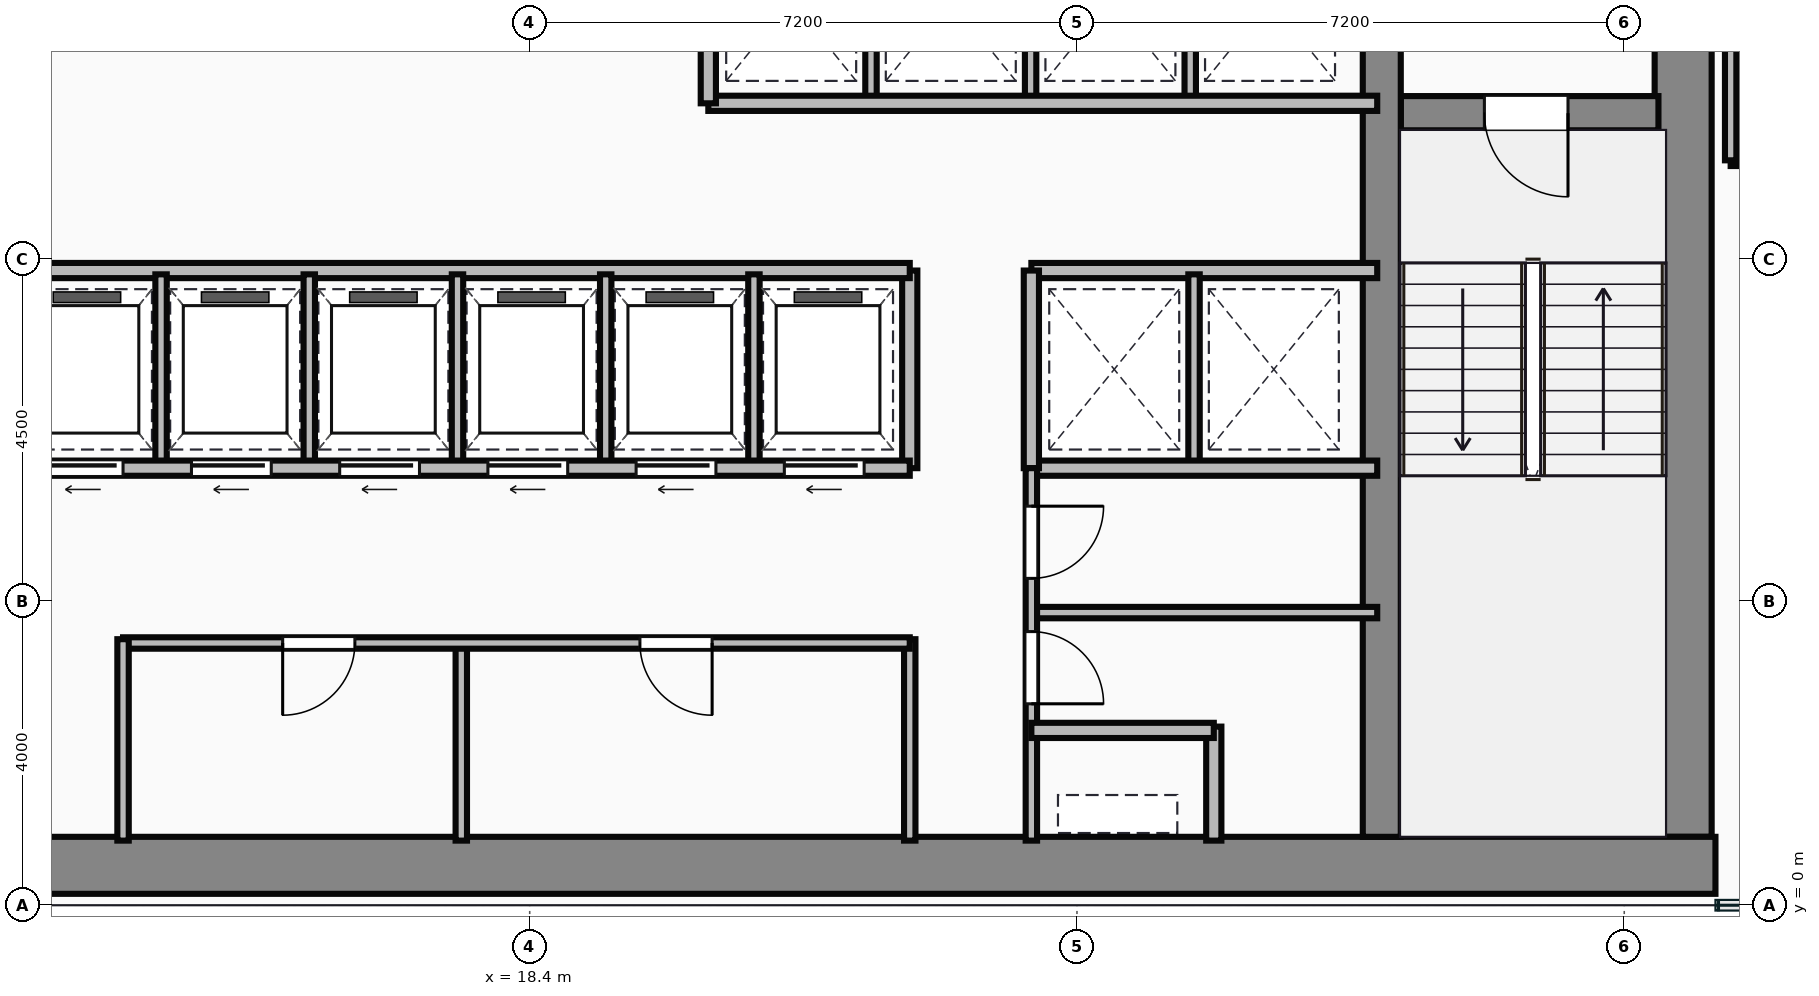
"""IFC4 building model, lengths in metres.
Left out: names, types, materials, properties, quantities, classifications, styles, units other than length and angle.
Written with IfcOpenShell. Run it as: python <this file> out.ifc"""

import sys

from ifc_helpers import new_model, si_unit, direction, frame, frame_2d, origin, place, context, subcontext, project, spatial, rectangle, extrude, source, transform, mapped, element, fill, save


model = new_model("IFC4")
c1 = context("Model", 3, precision=1e-05, world=origin(), true_north=direction((0.0, 1.0)))
c2 = subcontext(c1, "Body", "Model", "MODEL_VIEW")
j1 = project(units=[si_unit("LENGTHUNIT", "METRE"), si_unit("PLANEANGLEUNIT", "RADIAN")], contexts=[c1])
p1 = place(None, origin())
s1 = spatial("IfcSite", under=j1, at=p1, CompositionType="ELEMENT")
p2 = place(p1, origin())
s2 = spatial("IfcBuilding", under=s1, at=p2, CompositionType="ELEMENT")
p3 = place(p2, frame((0.0, 0.0, 110.55)))
s3 = spatial("IfcBuildingStorey", under=s2, at=p3, CompositionType="ELEMENT", Elevation=110.55)
m1 = source(origin(), c2, "Body", "SweptSolid", [
    extrude(rectangle(XDim=29.5, YDim=0.75, at=frame_2d((14.75, 0.0))), origin(), (0.0, 0.0, 1.0), 3.65),
])
p4 = place(p3, frame((4.5, 0.525, 0.0), z_axis=(0.0, 0.0, 1.0), x_axis=(1.0, 0.0, 0.0)))
e1 = element("IfcWall", 1, at=p4, inside=s3, PredefinedType="SHEAR", context=c2, shape_type="MappedRepresentation", body=[
    mapped(m1, transform((0.0, 0.0, 0.0))),
])
m2 = source(origin(), c2, "Body", "SweptSolid", [
    extrude(rectangle(XDim=13.1, YDim=0.75, at=frame_2d((6.55, 0.0))), origin(), (0.0, 0.0, 1.0), 3.65),
])
p5 = place(p3, frame((33.575, 0.9, 0.0), z_axis=(0.0, 0.0, 1.0), x_axis=(0.0, 1.0, 0.0)))
e2 = element("IfcWall", 2, at=p5, inside=s3, PredefinedType="SHEAR", context=c2, shape_type="MappedRepresentation", body=[
    mapped(m2, transform((0.0, 0.0, 0.0))),
])
m3 = source(origin(), c2, "Body", "SweptSolid", [
    extrude(rectangle(XDim=12.35, YDim=0.5, at=frame_2d((6.175, 0.0))), origin(), (0.0, 0.0, 1.0), 3.65),
])
p6 = place(p3, frame((29.61, 0.9, 0.0), z_axis=(0.0, 0.0, 1.0), x_axis=(0.0, 1.0, 0.0)))
e3 = element("IfcWall", 3, at=p6, inside=s3, PredefinedType="SHEAR", context=c2, shape_type="MappedRepresentation", body=[
    mapped(m3, transform((0.0, 0.0, 0.0))),
])
m4 = source(origin(), c2, "Body", "SweptSolid", [
    extrude(rectangle(XDim=3.39, YDim=0.45, at=frame_2d((1.695, 0.0))), origin(), (0.0, 0.0, 1.0), 3.65),
])
p7 = place(p3, frame((29.86, 10.42, 0.0), z_axis=(0.0, 0.0, 1.0), x_axis=(1.0, 0.0, 0.0)))
e4 = element("IfcWall", 4, at=p7, inside=s3, PredefinedType="SHEAR", context=c2, shape_type="MappedRepresentation", body=[
    mapped(m4, transform((0.0, 0.0, 0.0))),
])
p8 = place(p7, frame((1.1, 0.0, 0.0)))
e5 = element("IfcOpeningElement", 5, at=p8, cuts=e4, PredefinedType="OPENING", context=c2, shape_type="SweptSolid", body=[
    extrude(rectangle(XDim=1.1, YDim=2.15, at=frame_2d((0.55, 1.075))), frame((0.0, 0.235, 0.0), z_axis=(0.0, -1.0, 0.0), x_axis=(1.0, 0.0, 0.0)), (0.0, 0.0, 1.0), 0.47),
])
m5 = source(origin(), c2, "Body", "SweptSolid", [
    extrude(rectangle(XDim=2.65, YDim=0.15, at=frame_2d((1.325, 0.0))), origin(), (0.0, 0.0, 1.0), 3.4),
])
p9 = place(p3, frame((13.05, 0.85, 0.0), z_axis=(0.0, 0.0, 1.0), x_axis=(0.0, 1.0, 0.0)))
e6 = element("IfcWall", 6, at=p9, inside=s3, PredefinedType="PARTITIONING", context=c2, shape_type="MappedRepresentation", body=[
    mapped(m5, transform((0.0, 0.0, 0.0))),
])
m6 = source(origin(), c2, "Body", "SweptSolid", [
    extrude(rectangle(XDim=10.35, YDim=0.15, at=frame_2d((5.175, 0.0))), origin(), (0.0, 0.0, 1.0), 3.4),
])
p10 = place(p3, frame((13.05, 3.45, 0.0), z_axis=(0.0, 0.0, 1.0), x_axis=(1.0, 0.0, 0.0)))
e7 = element("IfcWall", 7, at=p10, inside=s3, PredefinedType="PARTITIONING", context=c2, shape_type="MappedRepresentation", body=[
    mapped(m6, transform((0.0, 0.0, 0.0))),
])
p11 = place(p10, frame((2.1, 0.0, 0.0)))
e8 = element("IfcOpeningElement", 8, at=p11, cuts=e7, PredefinedType="OPENING", context=c2, shape_type="SweptSolid", body=[
    extrude(rectangle(XDim=0.95, YDim=2.15, at=frame_2d((0.475, 1.075))), frame((0.0, 0.085, 0.0), z_axis=(0.0, -1.0, 0.0), x_axis=(1.0, 0.0, 0.0)), (0.0, 0.0, 1.0), 0.17),
])
p12 = place(p10, frame((6.8, 0.0, 0.0)))
e9 = element("IfcOpeningElement", 9, at=p12, cuts=e7, PredefinedType="OPENING", context=c2, shape_type="SweptSolid", body=[
    extrude(rectangle(XDim=0.95, YDim=2.15, at=frame_2d((0.475, 1.075))), frame((0.0, 0.085, 0.0), z_axis=(0.0, -1.0, 0.0), x_axis=(1.0, 0.0, 0.0)), (0.0, 0.0, 1.0), 0.17),
])
p13 = place(p3, frame((23.4, 0.85, 0.0), z_axis=(0.0, 0.0, 1.0), x_axis=(0.0, 1.0, 0.0)))
e10 = element("IfcWall", 10, at=p13, inside=s3, PredefinedType="PARTITIONING", context=c2, shape_type="MappedRepresentation", body=[
    mapped(m5, transform((0.0, 0.0, 0.0))),
])
m7 = source(origin(), c2, "Body", "SweptSolid", [
    extrude(rectangle(XDim=2.6, YDim=0.15, at=frame_2d((1.3, 0.0))), origin(), (0.0, 0.0, 1.0), 3.4),
])
p14 = place(p3, frame((17.5, 0.85, 0.0), z_axis=(0.0, 0.0, 1.0), x_axis=(0.0, 1.0, 0.0)))
e11 = element("IfcWall", 11, at=p14, inside=s3, PredefinedType="PARTITIONING", context=c2, shape_type="MappedRepresentation", body=[
    mapped(m7, transform((0.0, 0.0, 0.0))),
])
m8 = source(origin(), c2, "Body", "SweptSolid", [
    extrude(rectangle(XDim=11.85, YDim=0.2, at=frame_2d((5.925, 0.0))), origin(), (0.0, 0.0, 1.0), 3.4),
])
p15 = place(p3, frame((11.55, 5.75, 0.0), z_axis=(0.0, 0.0, 1.0), x_axis=(1.0, 0.0, 0.0)))
e12 = element("IfcWall", 12, at=p15, inside=s3, PredefinedType="PARTITIONING", context=c2, shape_type="MappedRepresentation", body=[
    mapped(m8, transform((0.0, 0.0, 0.0))),
])
p16 = place(p15, frame((0.45, 0.0, 0.0)))
e13 = element("IfcOpeningElement", 13, at=p16, cuts=e12, PredefinedType="OPENING", context=c2, shape_type="SweptSolid", body=[
    extrude(rectangle(XDim=1.05, YDim=2.15, at=frame_2d((0.525, 1.075))), frame((0.0, 0.11, 0.0), z_axis=(0.0, -1.0, 0.0), x_axis=(1.0, 0.0, 0.0)), (0.0, 0.0, 1.0), 0.22),
])
p17 = place(p15, frame((2.4, 0.0, 0.0)))
e14 = element("IfcOpeningElement", 14, at=p17, cuts=e12, PredefinedType="OPENING", context=c2, shape_type="SweptSolid", body=[
    extrude(rectangle(XDim=1.05, YDim=2.15, at=frame_2d((0.525, 1.075))), frame((0.0, 0.11, 0.0), z_axis=(0.0, -1.0, 0.0), x_axis=(1.0, 0.0, 0.0)), (0.0, 0.0, 1.0), 0.22),
])
p18 = place(p15, frame((4.35, 0.0, 0.0)))
e15 = element("IfcOpeningElement", 15, at=p18, cuts=e12, PredefinedType="OPENING", context=c2, shape_type="SweptSolid", body=[
    extrude(rectangle(XDim=1.05, YDim=2.15, at=frame_2d((0.525, 1.075))), frame((0.0, 0.11, 0.0), z_axis=(0.0, -1.0, 0.0), x_axis=(1.0, 0.0, 0.0)), (0.0, 0.0, 1.0), 0.22),
])
p19 = place(p15, frame((6.3, 0.0, 0.0)))
e16 = element("IfcOpeningElement", 16, at=p19, cuts=e12, PredefinedType="OPENING", context=c2, shape_type="SweptSolid", body=[
    extrude(rectangle(XDim=1.05, YDim=2.15, at=frame_2d((0.525, 1.075))), frame((0.0, 0.11, 0.0), z_axis=(0.0, -1.0, 0.0), x_axis=(1.0, 0.0, 0.0)), (0.0, 0.0, 1.0), 0.22),
])
p20 = place(p15, frame((8.25, 0.0, 0.0)))
e17 = element("IfcOpeningElement", 17, at=p20, cuts=e12, PredefinedType="OPENING", context=c2, shape_type="SweptSolid", body=[
    extrude(rectangle(XDim=1.05, YDim=2.15, at=frame_2d((0.525, 1.075))), frame((0.0, 0.11, 0.0), z_axis=(0.0, -1.0, 0.0), x_axis=(1.0, 0.0, 0.0)), (0.0, 0.0, 1.0), 0.22),
])
p21 = place(p15, frame((10.2, 0.0, 0.0)))
e18 = element("IfcOpeningElement", 18, at=p21, cuts=e12, PredefinedType="OPENING", context=c2, shape_type="SweptSolid", body=[
    extrude(rectangle(XDim=1.05, YDim=2.15, at=frame_2d((0.525, 1.075))), frame((0.0, 0.11, 0.0), z_axis=(0.0, -1.0, 0.0), x_axis=(1.0, 0.0, 0.0)), (0.0, 0.0, 1.0), 0.22),
])
p22 = place(p3, frame((11.55, 8.35, 0.0), z_axis=(0.0, 0.0, 1.0), x_axis=(1.0, 0.0, 0.0)))
e19 = element("IfcWall", 19, at=p22, inside=s3, PredefinedType="PARTITIONING", context=c2, shape_type="MappedRepresentation", body=[
    mapped(m8, transform((0.0, 0.0, 0.0))),
])
m9 = source(origin(), c2, "Body", "SweptSolid", [
    extrude(rectangle(XDim=2.6, YDim=0.2, at=frame_2d((1.3, 0.0))), origin(), (0.0, 0.0, 1.0), 3.4),
])
p23 = place(p3, frame((23.4, 5.75, 0.0), z_axis=(0.0, 0.0, 1.0), x_axis=(0.0, 1.0, 0.0)))
e20 = element("IfcWall", 20, at=p23, inside=s3, PredefinedType="PARTITIONING", context=c2, shape_type="MappedRepresentation", body=[
    mapped(m9, transform((0.0, 0.0, 0.0))),
])
m10 = source(origin(), c2, "Body", "SweptSolid", [
    extrude(rectangle(XDim=2.5, YDim=0.15, at=frame_2d((1.25, 0.0))), origin(), (0.0, 0.0, 1.0), 3.4),
])
for number, where, z_axis, x_axis in (
    (21, (13.55, 5.8, 0.0), (0.0, 0.0, 1.0), (0.0, 1.0, 0.0)),
    (22, (15.5, 5.8, 0.0), (0.0, 0.0, 1.0), (0.0, 1.0, 0.0)),
    (23, (17.45, 5.8, 0.0), (0.0, 0.0, 1.0), (0.0, 1.0, 0.0)),
    (24, (19.4, 5.8, 0.0), (0.0, 0.0, 1.0), (0.0, 1.0, 0.0)),
    (25, (21.35, 5.8, 0.0), (0.0, 0.0, 1.0), (0.0, 1.0, 0.0)),
):
    element("IfcWall", number, at=place(p3, frame(where, z_axis=z_axis, x_axis=x_axis)), inside=s3, PredefinedType="PARTITIONING", context=c2, shape_type="MappedRepresentation", body=[
        mapped(m10, transform((0.0, 0.0, 0.0))),
    ])
m11 = source(origin(), c2, "Body", "SweptSolid", [
    extrude(rectangle(XDim=8.8, YDim=0.2, at=frame_2d((4.4, 0.0))), origin(), (0.0, 0.0, 1.0), 3.4),
])
p24 = place(p3, frame((20.75, 10.55, 0.0), z_axis=(0.0, 0.0, 1.0), x_axis=(1.0, 0.0, 0.0)))
e26 = element("IfcWall", 26, at=p24, inside=s3, PredefinedType="PARTITIONING", context=c2, shape_type="MappedRepresentation", body=[
    mapped(m11, transform((0.0, 0.0, 0.0))),
])
m12 = source(origin(), c2, "Body", "SweptSolid", [
    extrude(rectangle(XDim=3.0, YDim=0.2, at=frame_2d((1.5, 0.0))), origin(), (0.0, 0.0, 1.0), 3.4),
])
p25 = place(p3, frame((20.75, 10.55, 0.0), z_axis=(0.0, 0.0, 1.0), x_axis=(0.0, 1.0, 0.0)))
e27 = element("IfcWall", 27, at=p25, inside=s3, PredefinedType="PARTITIONING", context=c2, shape_type="MappedRepresentation", body=[
    mapped(m12, transform((0.0, 0.0, 0.0))),
])
m13 = source(origin(), c2, "Body", "SweptSolid", [
    extrude(rectangle(XDim=2.85, YDim=0.15, at=frame_2d((1.425, 0.0))), origin(), (0.0, 0.0, 1.0), 3.4),
])
for number, where, z_axis, x_axis in (
    (28, (22.89, 10.6, 0.0), (0.0, 0.0, 1.0), (0.0, 1.0, 0.0)),
    (29, (24.99, 10.6, 0.0), (0.0, 0.0, 1.0), (0.0, 1.0, 0.0)),
    (30, (27.09, 10.6, 0.0), (0.0, 0.0, 1.0), (0.0, 1.0, 0.0)),
):
    element("IfcWall", number, at=place(p3, frame(where, z_axis=z_axis, x_axis=x_axis)), inside=s3, PredefinedType="PARTITIONING", context=c2, shape_type="MappedRepresentation", body=[
        mapped(m13, transform((0.0, 0.0, 0.0))),
    ])
m14 = source(origin(), c2, "Body", "SweptSolid", [
    extrude(rectangle(XDim=4.55, YDim=0.2, at=frame_2d((2.275, 0.0))), origin(), (0.0, 0.0, 1.0), 3.4),
])
for number, where, z_axis, x_axis in (
    (31, (25.0, 8.35, 0.0), (0.0, 0.0, 1.0), (1.0, 0.0, 0.0)),
    (32, (25.0, 5.75, 0.0), (0.0, 0.0, 1.0), (1.0, 0.0, 0.0)),
):
    element("IfcWall", number, at=place(p3, frame(where, z_axis=z_axis, x_axis=x_axis)), inside=s3, PredefinedType="PARTITIONING", context=c2, shape_type="MappedRepresentation", body=[
        mapped(m14, transform((0.0, 0.0, 0.0))),
    ])
p26 = place(p3, frame((25.0, 5.75, 0.0), z_axis=(0.0, 0.0, 1.0), x_axis=(0.0, 1.0, 0.0)))
e33 = element("IfcWall", 33, at=p26, inside=s3, PredefinedType="PARTITIONING", context=c2, shape_type="MappedRepresentation", body=[
    mapped(m9, transform((0.0, 0.0, 0.0))),
])
p27 = place(p3, frame((27.14, 5.8, 0.0), z_axis=(0.0, 0.0, 1.0), x_axis=(0.0, 1.0, 0.0)))
e34 = element("IfcWall", 34, at=p27, inside=s3, PredefinedType="PARTITIONING", context=c2, shape_type="MappedRepresentation", body=[
    mapped(m10, transform((0.0, 0.0, 0.0))),
])
m15 = source(origin(), c2, "Body", "SweptSolid", [
    extrude(rectangle(XDim=4.9, YDim=0.15, at=frame_2d((2.45, 0.0))), origin(), (0.0, 0.0, 1.0), 3.4),
])
p28 = place(p3, frame((25.0, 0.85, 0.0), z_axis=(0.0, 0.0, 1.0), x_axis=(0.0, 1.0, 0.0)))
e35 = element("IfcWall", 35, at=p28, inside=s3, PredefinedType="PARTITIONING", context=c2, shape_type="MappedRepresentation", body=[
    mapped(m15, transform((0.0, 0.0, 0.0))),
])
p29 = place(p28, frame((1.8, 0.0, 0.0)))
e36 = element("IfcOpeningElement", 36, at=p29, cuts=e35, PredefinedType="OPENING", context=c2, shape_type="SweptSolid", body=[
    extrude(rectangle(XDim=0.95, YDim=2.15, at=frame_2d((0.475, 1.075))), frame((0.0, 0.085, 0.0), z_axis=(0.0, -1.0, 0.0), x_axis=(1.0, 0.0, 0.0)), (0.0, 0.0, 1.0), 0.17),
])
p30 = place(p28, frame((3.45, 0.0, 0.0)))
e37 = element("IfcOpeningElement", 37, at=p30, cuts=e35, PredefinedType="OPENING", context=c2, shape_type="SweptSolid", body=[
    extrude(rectangle(XDim=0.95, YDim=2.15, at=frame_2d((0.475, 1.075))), frame((0.0, 0.085, 0.0), z_axis=(0.0, -1.0, 0.0), x_axis=(1.0, 0.0, 0.0)), (0.0, 0.0, 1.0), 0.17),
])
m16 = source(origin(), c2, "Body", "SweptSolid", [
    extrude(rectangle(XDim=2.4, YDim=0.2, at=frame_2d((1.2, 0.0))), origin(), (0.0, 0.0, 1.0), 3.4),
])
p31 = place(p3, frame((25.0, 2.3, 0.0), z_axis=(0.0, 0.0, 1.0), x_axis=(1.0, 0.0, 0.0)))
e38 = element("IfcWall", 38, at=p31, inside=s3, PredefinedType="PARTITIONING", context=c2, shape_type="MappedRepresentation", body=[
    mapped(m16, transform((0.0, 0.0, 0.0))),
])
m17 = source(origin(), c2, "Body", "SweptSolid", [
    extrude(rectangle(XDim=1.5, YDim=0.2, at=frame_2d((0.75, 0.0))), origin(), (0.0, 0.0, 1.0), 3.4),
])
p32 = place(p3, frame((27.4, 0.85, 0.0), z_axis=(0.0, 0.0, 1.0), x_axis=(0.0, 1.0, 0.0)))
e39 = element("IfcWall", 39, at=p32, inside=s3, PredefinedType="PARTITIONING", context=c2, shape_type="MappedRepresentation", body=[
    mapped(m17, transform((0.0, 0.0, 0.0))),
])
m18 = source(origin(), c2, "Body", "SweptSolid", [
    extrude(rectangle(XDim=4.55, YDim=0.15, at=frame_2d((2.275, 0.0))), origin(), (0.0, 0.0, 1.0), 3.4),
])
p33 = place(p3, frame((25.0, 3.85, 0.0), z_axis=(0.0, 0.0, 1.0), x_axis=(1.0, 0.0, 0.0)))
e40 = element("IfcWall", 40, at=p33, inside=s3, PredefinedType="PARTITIONING", context=c2, shape_type="MappedRepresentation", body=[
    mapped(m18, transform((0.0, 0.0, 0.0))),
])
m19 = source(origin(), c2, "Body", "SweptSolid", [
    extrude(rectangle(XDim=4.8, YDim=0.15, at=frame_2d((2.4, 0.0))), origin(), (0.0, 0.0, 1.0), 3.4),
])
p34 = place(p3, frame((34.2, 9.8, 0.0), z_axis=(0.0, 0.0, 1.0), x_axis=(1.0, 0.0, 0.0)))
e41 = element("IfcWall", 41, at=p34, inside=s3, PredefinedType="PARTITIONING", context=c2, shape_type="MappedRepresentation", body=[
    mapped(m19, transform((0.0, 0.0, 0.0))),
])
m20 = source(origin(), c2, "Body", "SweptSolid", [
    extrude(rectangle(XDim=4.18, YDim=0.15, at=frame_2d((2.09, 0.0))), origin(), (0.0, 0.0, 1.0), 3.4),
])
p35 = place(p3, frame((34.2, 9.8, 0.0), z_axis=(0.0, 0.0, 1.0), x_axis=(0.0, 1.0, 0.0)))
e42 = element("IfcWall", 42, at=p35, inside=s3, PredefinedType="PARTITIONING", context=c2, shape_type="MappedRepresentation", body=[
    mapped(m20, transform((0.0, 0.0, 0.0))),
])
m21 = source(origin(), c2, "Body", "SweptSolid", [
    extrude(rectangle(XDim=1.1, YDim=2.15, at=frame_2d((0.55, 1.075))), frame((0.0, 0.025, 0.0), z_axis=(0.0, -1.0, 0.0), x_axis=(1.0, 0.0, 0.0)), (0.0, 0.0, 1.0), 0.05),
])
p36 = place(p8, frame((1.1, 0.0, 0.0), z_axis=(0.0, 0.0, 1.0), x_axis=(-1.0, 0.0, 0.0)))
e43 = element("IfcDoor", 43, at=p36, inside=s3, OperationType="SINGLE_SWING_RIGHT", PredefinedType="DOOR", context=c2, shape_type="MappedRepresentation", body=[
    mapped(m21, transform((0.0, 0.0, 0.0))),
])
fill(e5, e43)
m22 = source(origin(), c2, "Body", "SweptSolid", [
    extrude(rectangle(XDim=0.95, YDim=2.15, at=frame_2d((0.475, 1.075))), frame((0.0, 0.025, 0.0), z_axis=(0.0, -1.0, 0.0), x_axis=(1.0, 0.0, 0.0)), (0.0, 0.0, 1.0), 0.05),
])
p37 = place(p11, origin())
e44 = element("IfcDoor", 44, at=p37, inside=s3, OperationType="SINGLE_SWING_LEFT", PredefinedType="DOOR", context=c2, shape_type="MappedRepresentation", body=[
    mapped(m22, transform((0.0, 0.0, 0.0))),
])
fill(e8, e44)
p38 = place(p12, origin())
e45 = element("IfcDoor", 45, at=p38, inside=s3, OperationType="SINGLE_SWING_RIGHT", PredefinedType="DOOR", context=c2, shape_type="MappedRepresentation", body=[
    mapped(m22, transform((0.0, 0.0, 0.0))),
])
fill(e9, e45)
m23 = source(origin(), c2, "Body", "SweptSolid", [
    extrude(rectangle(XDim=1.05, YDim=2.15, at=frame_2d((0.525, 1.075))), frame((0.0, 0.025, 0.0), z_axis=(0.0, -1.0, 0.0), x_axis=(1.0, 0.0, 0.0)), (0.0, 0.0, 1.0), 0.05),
])
p39 = place(p16, frame((1.05, 0.0, 0.0), z_axis=(0.0, 0.0, 1.0), x_axis=(-1.0, 0.0, 0.0)))
e46 = element("IfcDoor", 46, at=p39, inside=s3, OperationType="SLIDING_TO_LEFT", PredefinedType="DOOR", context=c2, shape_type="MappedRepresentation", body=[
    mapped(m23, transform((0.0, 0.0, 0.0))),
])
fill(e13, e46)
p40 = place(p17, frame((1.05, 0.0, 0.0), z_axis=(0.0, 0.0, 1.0), x_axis=(-1.0, 0.0, 0.0)))
e47 = element("IfcDoor", 47, at=p40, inside=s3, OperationType="SLIDING_TO_LEFT", PredefinedType="DOOR", context=c2, shape_type="MappedRepresentation", body=[
    mapped(m23, transform((0.0, 0.0, 0.0))),
])
fill(e14, e47)
p41 = place(p18, frame((1.05, 0.0, 0.0), z_axis=(0.0, 0.0, 1.0), x_axis=(-1.0, 0.0, 0.0)))
e48 = element("IfcDoor", 48, at=p41, inside=s3, OperationType="SLIDING_TO_LEFT", PredefinedType="DOOR", context=c2, shape_type="MappedRepresentation", body=[
    mapped(m23, transform((0.0, 0.0, 0.0))),
])
fill(e15, e48)
p42 = place(p19, frame((1.05, 0.0, 0.0), z_axis=(0.0, 0.0, 1.0), x_axis=(-1.0, 0.0, 0.0)))
e49 = element("IfcDoor", 49, at=p42, inside=s3, OperationType="SLIDING_TO_LEFT", PredefinedType="DOOR", context=c2, shape_type="MappedRepresentation", body=[
    mapped(m23, transform((0.0, 0.0, 0.0))),
])
fill(e16, e49)
p43 = place(p20, frame((1.05, 0.0, 0.0), z_axis=(0.0, 0.0, 1.0), x_axis=(-1.0, 0.0, 0.0)))
e50 = element("IfcDoor", 50, at=p43, inside=s3, OperationType="SLIDING_TO_LEFT", PredefinedType="DOOR", context=c2, shape_type="MappedRepresentation", body=[
    mapped(m23, transform((0.0, 0.0, 0.0))),
])
fill(e17, e50)
p44 = place(p21, frame((1.05, 0.0, 0.0), z_axis=(0.0, 0.0, 1.0), x_axis=(-1.0, 0.0, 0.0)))
e51 = element("IfcDoor", 51, at=p44, inside=s3, OperationType="SLIDING_TO_LEFT", PredefinedType="DOOR", context=c2, shape_type="MappedRepresentation", body=[
    mapped(m23, transform((0.0, 0.0, 0.0))),
])
fill(e18, e51)
p45 = place(p29, origin())
e52 = element("IfcDoor", 52, at=p45, inside=s3, OperationType="SINGLE_SWING_LEFT", PredefinedType="DOOR", context=c2, shape_type="MappedRepresentation", body=[
    mapped(m22, transform((0.0, 0.0, 0.0))),
])
fill(e36, e52)
p46 = place(p30, origin())
e53 = element("IfcDoor", 53, at=p46, inside=s3, OperationType="SINGLE_SWING_RIGHT", PredefinedType="DOOR", context=c2, shape_type="MappedRepresentation", body=[
    mapped(m22, transform((0.0, 0.0, 0.0))),
])
fill(e37, e53)
save(model, sys.argv[1])
